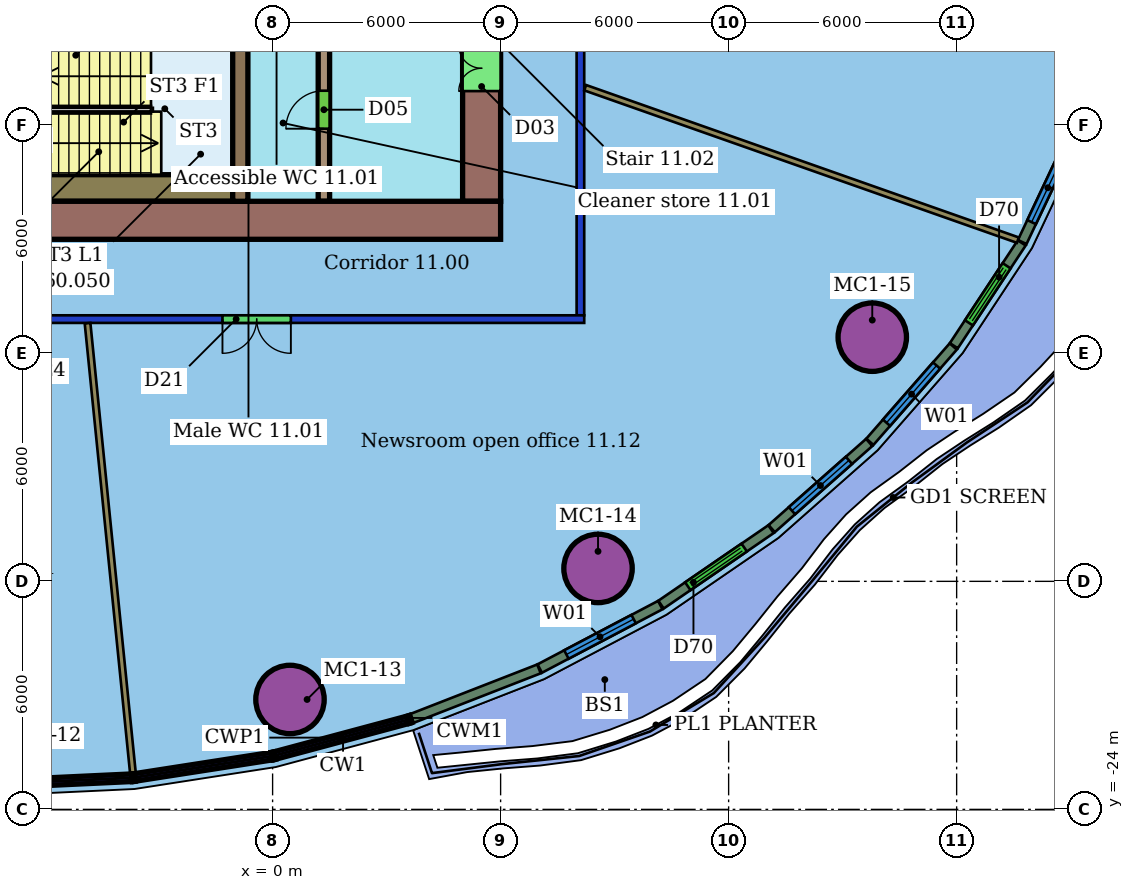
"""IFC4 building model, lengths in metres.
Left out: names, types, materials, properties, quantities, classifications, styles, units other than length and angle.
Written with IfcOpenShell. Run it as: python <this file> out.ifc"""

import sys

from ifc_helpers import new_model, si_unit, direction, frame, frame_2d, origin, origin_2d, place, context, subcontext, project, spatial, rectangle, hollow_circle, extrude, element, fill, save


model = new_model("IFC4")
c1 = context("Model", 3, precision=1e-05, world=origin(), true_north=direction((0.0, 1.0)))
c2 = subcontext(c1, "Body", "Model", "MODEL_VIEW")
j1 = project(units=[si_unit("LENGTHUNIT", "METRE"), si_unit("PLANEANGLEUNIT", "RADIAN")], contexts=[c1])
p1 = place(None, origin())
s1 = spatial("IfcSite", under=j1, at=p1, CompositionType="ELEMENT")
p2 = place(p1, origin())
s2 = spatial("IfcBuilding", under=s1, at=p2, CompositionType="ELEMENT")
p3 = place(p2, frame((0.0, 0.0, 58.2)))
s3 = spatial("IfcBuildingStorey", under=s2, at=p3, CompositionType="ELEMENT", Elevation=58.2)
for number, where, z_axis, x_axis in (
    (1, (0.458, -21.108, 0.0), (0.0, 0.0, 1.0), (1.0, 0.0, 0.0)),
    (2, (8.563, -17.66, 0.0), (0.0, 0.0, 1.0), (1.0, 0.0, 0.0)),
    (3, (15.78, -11.576, 0.0), (0.0, 0.0, 1.0), (1.0, 0.0, 0.0)),
):
    element("IfcColumn", number, at=place(p3, frame(where, z_axis=z_axis, x_axis=x_axis)), inside=s3, PredefinedType="COLUMN", context=c2, shape_type="SweptSolid", body=[
        extrude(hollow_circle(Radius=0.9, WallThickness=0.06, at=origin_2d()), origin(), (0.0, 0.0, 1.0), 3.55),
    ])
p4 = place(p3, frame((8.2, -11.1, 0.0), z_axis=(0.0, 0.0, 1.0), x_axis=(-1.0, 0.0, 0.0)))
e4 = element("IfcWall", 4, at=p4, inside=s3, PredefinedType="PARTITIONING", context=c2, shape_type="SweptSolid", body=[
    extrude(rectangle(XDim=28.4, YDim=0.2, at=frame_2d((14.2, 0.0))), origin(), (0.0, 0.0, 1.0), 2.85),
])
p5 = place(p4, frame((20.481, 0.0, 0.0)))
e5 = element("IfcOpeningElement", 5, at=p5, cuts=e4, PredefinedType="OPENING", context=c2, shape_type="SweptSolid", body=[
    extrude(rectangle(XDim=1.1, YDim=2.1, at=frame_2d((0.55, 1.05))), frame((0.0, 0.11, 0.0), z_axis=(0.0, -1.0, 0.0), x_axis=(1.0, 0.0, 0.0)), (0.0, 0.0, 1.0), 0.22),
])
p6 = place(p4, frame((15.652, 0.0, 0.0)))
e6 = element("IfcOpeningElement", 6, at=p6, cuts=e4, PredefinedType="OPENING", context=c2, shape_type="SweptSolid", body=[
    extrude(rectangle(XDim=1.5, YDim=2.1, at=frame_2d((0.75, 1.05))), frame((0.0, 0.11, 0.0), z_axis=(0.0, -1.0, 0.0), x_axis=(1.0, 0.0, 0.0)), (0.0, 0.0, 1.0), 0.22),
])
p7 = place(p4, frame((7.719, 0.0, 0.0)))
e7 = element("IfcOpeningElement", 7, at=p7, cuts=e4, PredefinedType="OPENING", context=c2, shape_type="SweptSolid", body=[
    extrude(rectangle(XDim=1.8, YDim=2.1, at=frame_2d((0.9, 1.05))), frame((0.0, 0.11, 0.0), z_axis=(0.0, -1.0, 0.0), x_axis=(1.0, 0.0, 0.0)), (0.0, 0.0, 1.0), 0.22),
])
p8 = place(p3, frame((8.1, 11.0, 0.0), z_axis=(0.0, 0.0, 1.0), x_axis=(0.0, -1.0, 0.0)))
e8 = element("IfcWall", 8, at=p8, inside=s3, PredefinedType="PARTITIONING", context=c2, shape_type="SweptSolid", body=[
    extrude(rectangle(XDim=22.0, YDim=0.2, at=frame_2d((11.0, 0.0))), origin(), (0.0, 0.0, 1.0), 2.85),
])
p9 = place(p8, frame((6.475, 0.0, 0.0)))
e9 = element("IfcOpeningElement", 9, at=p9, cuts=e8, PredefinedType="OPENING", context=c2, shape_type="SweptSolid", body=[
    extrude(rectangle(XDim=1.1, YDim=2.1, at=frame_2d((0.55, 1.05))), frame((0.0, 0.11, 0.0), z_axis=(0.0, -1.0, 0.0), x_axis=(1.0, 0.0, 0.0)), (0.0, 0.0, 1.0), 0.22),
])
p10 = place(p8, frame((13.242, 0.0, 0.0)))
e10 = element("IfcOpeningElement", 10, at=p10, cuts=e8, PredefinedType="OPENING", context=c2, shape_type="SweptSolid", body=[
    extrude(rectangle(XDim=0.9, YDim=2.1, at=frame_2d((0.45, 1.05))), frame((0.0, 0.11, 0.0), z_axis=(0.0, -1.0, 0.0), x_axis=(1.0, 0.0, 0.0)), (0.0, 0.0, 1.0), 0.22),
])
p11 = place(p3, frame((-3.676, -23.041, 0.0), z_axis=(0.0, 0.0, 1.0), x_axis=(-0.100357287096, 0.994951463603, 0.0)))
e11 = element("IfcWall", 11, at=p11, inside=s3, PredefinedType="PARTITIONING", context=c2, shape_type="SweptSolid", body=[
    extrude(rectangle(XDim=11.894, YDim=0.15, at=frame_2d((5.947, 0.0))), origin(), (0.0, 0.0, 1.0), 3.55),
])
p12 = place(p3, frame((19.611, -9.022, 0.0), z_axis=(0.0, 0.0, 1.0), x_axis=(-0.943187678435, 0.332260444904, 0.0)))
e12 = element("IfcWall", 12, at=p12, inside=s3, PredefinedType="PARTITIONING", context=c2, shape_type="SweptSolid", body=[
    extrude(rectangle(XDim=12.072, YDim=0.15, at=frame_2d((6.036, 0.0))), origin(), (0.0, 0.0, 1.0), 3.55),
])
p13 = place(p3, frame((3.655, -21.612, 0.0), z_axis=(0.0, 0.0, 1.0), x_axis=(0.931645373633, 0.363368817853, 0.0)))
e13 = element("IfcWall", 13, at=p13, inside=s3, PredefinedType="SOLIDWALL", context=c2, shape_type="SweptSolid", body=[
    extrude(rectangle(XDim=3.601, YDim=0.25, at=frame_2d((1.8, 0.0))), origin(), (0.0, 0.0, 1.0), 3.15),
])
p14 = place(p3, frame((7.03, -20.294, 0.0), z_axis=(0.0, 0.0, 1.0), x_axis=(0.884873899138, 0.465830637274, 0.0)))
e14 = element("IfcWall", 14, at=p14, inside=s3, PredefinedType="SOLIDWALL", context=c2, shape_type="SweptSolid", body=[
    extrude(rectangle(XDim=3.585, YDim=0.25, at=frame_2d((1.792, 0.0))), origin(), (0.0, 0.0, 1.0), 3.15),
])
p15 = place(p14, frame((0.792, 0.0, 0.8)))
e15 = element("IfcOpeningElement", 15, at=p15, cuts=e14, PredefinedType="OPENING", context=c2, shape_type="SweptSolid", body=[
    extrude(rectangle(XDim=2.0, YDim=2.2, at=frame_2d((1.0, 1.1))), frame((0.0, 0.135, 0.0), z_axis=(0.0, -1.0, 0.0), x_axis=(1.0, 0.0, 0.0)), (0.0, 0.0, 1.0), 0.27),
])
p16 = place(p3, frame((10.221, -18.613, 0.0), z_axis=(0.0, 0.0, 1.0), x_axis=(0.824494262273, 0.565870313304, 0.0)))
e16 = element("IfcWall", 16, at=p16, inside=s3, PredefinedType="SOLIDWALL", context=c2, shape_type="SweptSolid", body=[
    extrude(rectangle(XDim=3.51, YDim=0.25, at=frame_2d((1.755, 0.0))), origin(), (0.0, 0.0, 1.0), 3.15),
])
p17 = place(p16, frame((0.855, 0.0, 0.0)))
e17 = element("IfcOpeningElement", 17, at=p17, cuts=e16, PredefinedType="OPENING", context=c2, shape_type="SweptSolid", body=[
    extrude(rectangle(XDim=1.8, YDim=2.4, at=frame_2d((0.9, 1.2))), frame((0.0, 0.135, 0.0), z_axis=(0.0, -1.0, 0.0), x_axis=(1.0, 0.0, 0.0)), (0.0, 0.0, 1.0), 0.27),
])
p18 = place(p3, frame((13.133, -16.613, 0.0), z_axis=(0.0, 0.0, 1.0), x_axis=(0.749392432233, 0.662126107711, 0.0)))
e18 = element("IfcWall", 18, at=p18, inside=s3, PredefinedType="SOLIDWALL", context=c2, shape_type="SweptSolid", body=[
    extrude(rectangle(XDim=3.424, YDim=0.25, at=frame_2d((1.712, 0.0))), origin(), (0.0, 0.0, 1.0), 3.15),
])
p19 = place(p18, frame((0.712, 0.0, 0.8)))
e19 = element("IfcOpeningElement", 19, at=p19, cuts=e18, PredefinedType="OPENING", context=c2, shape_type="SweptSolid", body=[
    extrude(rectangle(XDim=2.0, YDim=2.2, at=frame_2d((1.0, 1.1))), frame((0.0, 0.135, 0.0), z_axis=(0.0, -1.0, 0.0), x_axis=(1.0, 0.0, 0.0)), (0.0, 0.0, 1.0), 0.27),
])
p20 = place(p3, frame((15.716, -14.328, 0.0), z_axis=(0.0, 0.0, 1.0), x_axis=(0.65843719002, 0.752635679993, 0.0)))
e20 = element("IfcWall", 20, at=p20, inside=s3, PredefinedType="SOLIDWALL", context=c2, shape_type="SweptSolid", body=[
    extrude(rectangle(XDim=3.333, YDim=0.25, at=frame_2d((1.667, 0.0))), origin(), (0.0, 0.0, 1.0), 3.15),
])
p21 = place(p20, frame((0.667, 0.0, 0.8)))
e21 = element("IfcOpeningElement", 21, at=p21, cuts=e20, PredefinedType="OPENING", context=c2, shape_type="SweptSolid", body=[
    extrude(rectangle(XDim=2.0, YDim=2.2, at=frame_2d((1.0, 1.1))), frame((0.0, 0.135, 0.0), z_axis=(0.0, -1.0, 0.0), x_axis=(1.0, 0.0, 0.0)), (0.0, 0.0, 1.0), 0.27),
])
p22 = place(p3, frame((17.926, -11.8, 0.0), z_axis=(0.0, 0.0, 1.0), x_axis=(0.550976461362, 0.834520784058, 0.0)))
e22 = element("IfcWall", 22, at=p22, inside=s3, PredefinedType="SOLIDWALL", context=c2, shape_type="SweptSolid", body=[
    extrude(rectangle(XDim=3.243, YDim=0.25, at=frame_2d((1.621, 0.0))), origin(), (0.0, 0.0, 1.0), 3.15),
])
p23 = place(p22, frame((0.721, 0.0, 0.0)))
e23 = element("IfcOpeningElement", 23, at=p23, cuts=e22, PredefinedType="OPENING", context=c2, shape_type="SweptSolid", body=[
    extrude(rectangle(XDim=1.8, YDim=2.4, at=frame_2d((0.9, 1.2))), frame((0.0, 0.135, 0.0), z_axis=(0.0, -1.0, 0.0), x_axis=(1.0, 0.0, 0.0)), (0.0, 0.0, 1.0), 0.27),
])
p24 = place(p3, frame((19.725, -9.072, 0.0), z_axis=(0.0, 0.0, 1.0), x_axis=(0.427069496555, 0.904218803781, 0.0)))
e24 = element("IfcWall", 24, at=p24, inside=s3, PredefinedType="SOLIDWALL", context=c2, shape_type="SweptSolid", body=[
    extrude(rectangle(XDim=3.159, YDim=0.25, at=frame_2d((1.58, 0.0))), origin(), (0.0, 0.0, 1.0), 3.15),
])
p25 = place(p24, frame((0.58, 0.0, 0.8)))
e25 = element("IfcOpeningElement", 25, at=p25, cuts=e24, PredefinedType="OPENING", context=c2, shape_type="SweptSolid", body=[
    extrude(rectangle(XDim=2.0, YDim=2.2, at=frame_2d((1.0, 1.1))), frame((0.0, 0.135, 0.0), z_axis=(0.0, -1.0, 0.0), x_axis=(1.0, 0.0, 0.0)), (0.0, 0.0, 1.0), 0.27),
])
p26 = place(p3, frame((-18.0, -8.5, 0.0), z_axis=(0.0, 0.0, 1.0), x_axis=(1.0, 0.0, 0.0)))
e26 = element("IfcWall", 26, at=p26, inside=s3, PredefinedType="SHEAR", context=c2, shape_type="SweptSolid", body=[
    extrude(rectangle(XDim=24.0, YDim=1.0, at=frame_2d((12.0, 0.0))), origin(), (0.0, 0.0, 1.0), 3.4),
])
p27 = place(p26, frame((6.0, 0.0, 0.0)))
e27 = element("IfcOpeningElement", 27, at=p27, cuts=e26, PredefinedType="OPENING", context=c2, shape_type="SweptSolid", body=[
    extrude(rectangle(XDim=1.2, YDim=2.1, at=frame_2d((0.6, 1.05))), frame((0.0, 0.51, 0.0), z_axis=(0.0, -1.0, 0.0), x_axis=(1.0, 0.0, 0.0)), (0.0, 0.0, 1.0), 1.02),
])
p28 = place(p3, frame((5.5, -8.0, 0.0), z_axis=(0.0, 0.0, 1.0), x_axis=(0.0, 1.0, 0.0)))
e28 = element("IfcWall", 28, at=p28, inside=s3, PredefinedType="SHEAR", context=c2, shape_type="SweptSolid", body=[
    extrude(rectangle(XDim=16.0, YDim=1.0, at=frame_2d((8.0, 0.0))), origin(), (0.0, 0.0, 1.0), 3.4),
])
p29 = place(p28, frame((2.9, 0.0, 0.0)))
e29 = element("IfcOpeningElement", 29, at=p29, cuts=e28, PredefinedType="OPENING", context=c2, shape_type="SweptSolid", body=[
    extrude(rectangle(XDim=1.2, YDim=2.1, at=frame_2d((0.6, 1.05))), frame((0.0, 0.51, 0.0), z_axis=(0.0, -1.0, 0.0), x_axis=(1.0, 0.0, 0.0)), (0.0, 0.0, 1.0), 1.02),
])
p30 = place(p28, frame((11.9, 0.0, 0.0)))
e30 = element("IfcOpeningElement", 30, at=p30, cuts=e28, PredefinedType="OPENING", context=c2, shape_type="SweptSolid", body=[
    extrude(rectangle(XDim=1.2, YDim=2.1, at=frame_2d((0.6, 1.05))), frame((0.0, 0.51, 0.0), z_axis=(0.0, -1.0, 0.0), x_axis=(1.0, 0.0, 0.0)), (0.0, 0.0, 1.0), 1.02),
])
p31 = place(p3, frame((1.35, -8.0, 0.0), z_axis=(0.0, 0.0, 1.0), x_axis=(0.0, 1.0, 0.0)))
e31 = element("IfcWall", 31, at=p31, inside=s3, PredefinedType="SHEAR", context=c2, shape_type="SweptSolid", body=[
    extrude(rectangle(XDim=16.0, YDim=0.3, at=frame_2d((8.0, 0.0))), origin(), (0.0, 0.0, 1.0), 3.4),
])
p32 = place(p31, frame((1.91, 0.0, 0.0)))
e32 = element("IfcOpeningElement", 32, at=p32, cuts=e31, PredefinedType="OPENING", context=c2, shape_type="SweptSolid", body=[
    extrude(rectangle(XDim=1.0, YDim=2.1, at=frame_2d((0.5, 1.05))), frame((0.0, 0.16, 0.0), z_axis=(0.0, -1.0, 0.0), x_axis=(1.0, 0.0, 0.0)), (0.0, 0.0, 1.0), 0.32),
])
p33 = place(p31, frame((7.25, 0.0, 0.0)))
e33 = element("IfcOpeningElement", 33, at=p33, cuts=e31, PredefinedType="OPENING", context=c2, shape_type="SweptSolid", body=[
    extrude(rectangle(XDim=1.5, YDim=2.1, at=frame_2d((0.75, 1.05))), frame((0.0, 0.16, 0.0), z_axis=(0.0, -1.0, 0.0), x_axis=(1.0, 0.0, 0.0)), (0.0, 0.0, 1.0), 0.32),
])
p34 = place(p3, frame((-0.85, -3.88, 0.0), z_axis=(0.0, 0.0, 1.0), x_axis=(0.0, -1.0, 0.0)))
e34 = element("IfcWall", 34, at=p34, inside=s3, PredefinedType="SHEAR", context=c2, shape_type="SweptSolid", body=[
    extrude(rectangle(XDim=4.12, YDim=0.4, at=frame_2d((2.06, 0.0))), origin(), (0.0, 0.0, 1.0), 3.4),
])
p35 = place(p3, frame((-8.1, -7.65, 0.0), z_axis=(0.0, 0.0, 1.0), x_axis=(1.0, 0.0, 0.0)))
e35 = element("IfcWall", 35, at=p35, inside=s3, PredefinedType="SHEAR", context=c2, shape_type="SweptSolid", body=[
    extrude(rectangle(XDim=7.05, YDim=0.7, at=frame_2d((3.525, 0.0))), origin(), (0.0, 0.0, 1.0), 3.4),
])
p36 = place(p7, origin())
e36 = element("IfcDoor", 36, at=p36, inside=s3, OperationType="DOUBLE_DOOR_SINGLE_SWING", PredefinedType="DOOR", context=c2, shape_type="SweptSolid", body=[
    extrude(rectangle(XDim=1.8, YDim=2.1, at=frame_2d((0.9, 1.05))), frame((0.0, 0.025, 0.0), z_axis=(0.0, -1.0, 0.0), x_axis=(1.0, 0.0, 0.0)), (0.0, 0.0, 1.0), 0.05),
])
fill(e7, e36)
p37 = place(p15, origin())
e37 = element("IfcWindow", 37, at=p37, inside=s3, PartitioningType="SINGLE_PANEL", PredefinedType="WINDOW", context=c2, shape_type="SweptSolid", body=[
    extrude(rectangle(XDim=2.0, YDim=2.2, at=frame_2d((1.0, 1.1))), frame((0.0, 0.03, 0.0), z_axis=(0.0, -1.0, 0.0), x_axis=(1.0, 0.0, 0.0)), (0.0, 0.0, 1.0), 0.06),
])
fill(e15, e37)
p38 = place(p17, origin())
e38 = element("IfcDoor", 38, at=p38, inside=s3, OperationType="DOUBLE_DOOR_SLIDING", PredefinedType="DOOR", context=c2, shape_type="SweptSolid", body=[
    extrude(rectangle(XDim=1.8, YDim=2.4, at=frame_2d((0.9, 1.2))), frame((0.0, 0.025, 0.0), z_axis=(0.0, -1.0, 0.0), x_axis=(1.0, 0.0, 0.0)), (0.0, 0.0, 1.0), 0.05),
])
fill(e17, e38)
p39 = place(p19, origin())
e39 = element("IfcWindow", 39, at=p39, inside=s3, PartitioningType="SINGLE_PANEL", PredefinedType="WINDOW", context=c2, shape_type="SweptSolid", body=[
    extrude(rectangle(XDim=2.0, YDim=2.2, at=frame_2d((1.0, 1.1))), frame((0.0, 0.03, 0.0), z_axis=(0.0, -1.0, 0.0), x_axis=(1.0, 0.0, 0.0)), (0.0, 0.0, 1.0), 0.06),
])
fill(e19, e39)
p40 = place(p21, origin())
e40 = element("IfcWindow", 40, at=p40, inside=s3, PartitioningType="SINGLE_PANEL", PredefinedType="WINDOW", context=c2, shape_type="SweptSolid", body=[
    extrude(rectangle(XDim=2.0, YDim=2.2, at=frame_2d((1.0, 1.1))), frame((0.0, 0.03, 0.0), z_axis=(0.0, -1.0, 0.0), x_axis=(1.0, 0.0, 0.0)), (0.0, 0.0, 1.0), 0.06),
])
fill(e21, e40)
p41 = place(p23, origin())
e41 = element("IfcDoor", 41, at=p41, inside=s3, OperationType="DOUBLE_DOOR_SLIDING", PredefinedType="DOOR", context=c2, shape_type="SweptSolid", body=[
    extrude(rectangle(XDim=1.8, YDim=2.4, at=frame_2d((0.9, 1.2))), frame((0.0, 0.025, 0.0), z_axis=(0.0, -1.0, 0.0), x_axis=(1.0, 0.0, 0.0)), (0.0, 0.0, 1.0), 0.05),
])
fill(e23, e41)
p42 = place(p25, origin())
e42 = element("IfcWindow", 42, at=p42, inside=s3, PartitioningType="SINGLE_PANEL", PredefinedType="WINDOW", context=c2, shape_type="SweptSolid", body=[
    extrude(rectangle(XDim=2.0, YDim=2.2, at=frame_2d((1.0, 1.1))), frame((0.0, 0.03, 0.0), z_axis=(0.0, -1.0, 0.0), x_axis=(1.0, 0.0, 0.0)), (0.0, 0.0, 1.0), 0.06),
])
fill(e25, e42)
p43 = place(p29, origin())
e43 = element("IfcDoor", 43, at=p43, inside=s3, OperationType="DOUBLE_DOOR_SINGLE_SWING", PredefinedType="NOTDEFINED", context=c2, shape_type="SweptSolid", body=[
    extrude(rectangle(XDim=1.2, YDim=2.1, at=frame_2d((0.6, 1.05))), frame((0.0, 0.025, 0.0), z_axis=(0.0, -1.0, 0.0), x_axis=(1.0, 0.0, 0.0)), (0.0, 0.0, 1.0), 0.05),
])
fill(e29, e43)
p44 = place(p32, origin())
e44 = element("IfcDoor", 44, at=p44, inside=s3, OperationType="SINGLE_SWING_LEFT", PredefinedType="NOTDEFINED", context=c2, shape_type="SweptSolid", body=[
    extrude(rectangle(XDim=1.0, YDim=2.1, at=frame_2d((0.5, 1.05))), frame((0.0, 0.025, 0.0), z_axis=(0.0, -1.0, 0.0), x_axis=(1.0, 0.0, 0.0)), (0.0, 0.0, 1.0), 0.05),
])
fill(e32, e44)
save(model, sys.argv[1])
